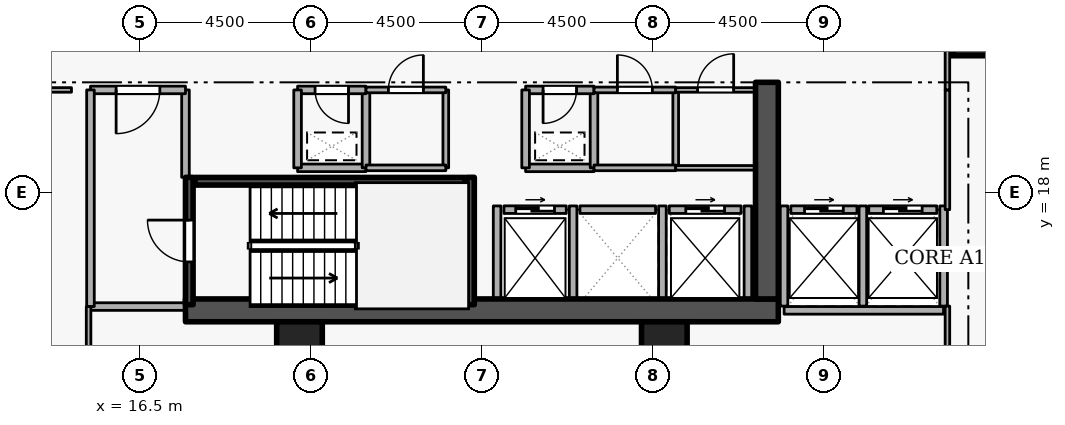
"""IFC4 building model, lengths in metres.
Left out: names, types, materials, properties, quantities, classifications, styles, units other than length and angle.
Written with IfcOpenShell. Run it as: python <this file> out.ifc"""

import sys

from ifc_helpers import new_model, si_unit, direction, frame, frame_2d, origin, origin_2d, place, context, subcontext, project, spatial, rectangle, extrude, element, fill, save


model = new_model("IFC4")
c1 = context("Model", 3, precision=1e-05, world=origin(), true_north=direction((0.0, 1.0)))
c2 = subcontext(c1, "Body", "Model", "MODEL_VIEW")
j1 = project(units=[si_unit("LENGTHUNIT", "METRE"), si_unit("PLANEANGLEUNIT", "RADIAN")], contexts=[c1])
p1 = place(None, origin())
s1 = spatial("IfcSite", under=j1, at=p1, CompositionType="ELEMENT")
p2 = place(p1, origin())
s2 = spatial("IfcBuilding", under=s1, at=p2, CompositionType="ELEMENT")
p3 = place(p2, frame((0.0, 0.0, 98.1)))
s3 = spatial("IfcBuildingStorey", under=s2, at=p3, CompositionType="ELEMENT", Elevation=98.1)
p4 = place(p3, frame((17.7, 14.9, 0.0), z_axis=(0.0, 0.0, 1.0), x_axis=(1.0, 0.0, 0.0)))
e1 = element("IfcWall", 1, at=p4, inside=s3, PredefinedType="SHEAR", context=c2, shape_type="SweptSolid", body=[
    extrude(rectangle(XDim=15.6, YDim=0.6, at=frame_2d((7.8, 0.0))), origin(), (0.0, 0.0, 1.0), 3.6),
])
p5 = place(p3, frame((33.0, 15.2, 0.0), z_axis=(0.0, 0.0, 1.0), x_axis=(0.0, 1.0, 0.0)))
e2 = element("IfcWall", 2, at=p5, inside=s3, PredefinedType="SHEAR", context=c2, shape_type="SweptSolid", body=[
    extrude(rectangle(XDim=5.7, YDim=0.6, at=frame_2d((2.85, 0.0))), origin(), (0.0, 0.0, 1.0), 3.6),
])
for number, where, z_axis, x_axis in (
    (3, (38.5, 22.2, 0.0), (0.0, 0.0, 1.0), (1.0, 0.0, 0.0)),
    (4, (20.7, 14.0, 0.0), (0.0, 0.0, 1.0), (1.0, 0.0, 0.0)),
    (5, (30.3, 14.0, 0.0), (0.0, 0.0, 1.0), (1.0, 0.0, 0.0)),
):
    element("IfcColumn", number, at=place(p3, frame(where, z_axis=z_axis, x_axis=x_axis)), inside=s3, PredefinedType="COLUMN", context=c2, shape_type="SweptSolid", body=[
        extrude(rectangle(XDim=1.2, YDim=1.2, at=origin_2d()), origin(), (0.0, 0.0, 1.0), 3.6),
    ])
p6 = place(p3, frame((26.08, 17.55, 0.0), z_axis=(0.0, 0.0, 1.0), x_axis=(1.0, 0.0, 0.0)))
e6 = element("IfcWall", 6, at=p6, inside=s3, PredefinedType="STANDARD", context=c2, shape_type="SweptSolid", body=[
    extrude(rectangle(XDim=1.64, YDim=0.2, at=frame_2d((0.82, 0.0))), origin(), (0.0, 0.0, 1.0), 3.3),
])
p7 = place(p6, frame((0.31, 0.0, 0.0)))
e7 = element("IfcOpeningElement", 7, at=p7, cuts=e6, PredefinedType="OPENING", context=c2, shape_type="SweptSolid", body=[
    extrude(rectangle(XDim=1.02, YDim=2.06, at=frame_2d((0.51, 1.03))), frame((0.0, 0.11, 0.0), z_axis=(0.0, -1.0, 0.0), x_axis=(1.0, 0.0, 0.0)), (0.0, 0.0, 1.0), 0.22),
])
p8 = place(p3, frame((28.08, 17.55, 0.0), z_axis=(0.0, 0.0, 1.0), x_axis=(1.0, 0.0, 0.0)))
e8 = element("IfcWall", 8, at=p8, inside=s3, PredefinedType="STANDARD", context=c2, shape_type="SweptSolid", body=[
    extrude(rectangle(XDim=1.99, YDim=0.2, at=frame_2d((0.995, 0.0))), origin(), (0.0, 0.0, 1.0), 3.3),
])
p9 = place(p3, frame((30.43, 17.55, 0.0), z_axis=(0.0, 0.0, 1.0), x_axis=(1.0, 0.0, 0.0)))
e9 = element("IfcWall", 9, at=p9, inside=s3, PredefinedType="STANDARD", context=c2, shape_type="SweptSolid", body=[
    extrude(rectangle(XDim=1.89, YDim=0.2, at=frame_2d((0.945, 0.0))), origin(), (0.0, 0.0, 1.0), 3.3),
])
p10 = place(p9, frame((0.435, 0.0, 0.0)))
e10 = element("IfcOpeningElement", 10, at=p10, cuts=e9, PredefinedType="OPENING", context=c2, shape_type="SweptSolid", body=[
    extrude(rectangle(XDim=1.02, YDim=2.06, at=frame_2d((0.51, 1.03))), frame((0.0, 0.11, 0.0), z_axis=(0.0, -1.0, 0.0), x_axis=(1.0, 0.0, 0.0)), (0.0, 0.0, 1.0), 0.22),
])
p11 = place(p3, frame((33.63, 17.55, 0.0), z_axis=(0.0, 0.0, 1.0), x_axis=(1.0, 0.0, 0.0)))
e11 = element("IfcWall", 11, at=p11, inside=s3, PredefinedType="STANDARD", context=c2, shape_type="SweptSolid", body=[
    extrude(rectangle(XDim=1.74, YDim=0.2, at=frame_2d((0.87, 0.0))), origin(), (0.0, 0.0, 1.0), 3.3),
])
p12 = place(p11, frame((0.36, 0.0, 0.0)))
e12 = element("IfcOpeningElement", 12, at=p12, cuts=e11, PredefinedType="OPENING", context=c2, shape_type="SweptSolid", body=[
    extrude(rectangle(XDim=1.02, YDim=2.06, at=frame_2d((0.51, 1.03))), frame((0.0, 0.11, 0.0), z_axis=(0.0, -1.0, 0.0), x_axis=(1.0, 0.0, 0.0)), (0.0, 0.0, 1.0), 0.22),
])
p13 = place(p3, frame((35.68, 17.55, 0.0), z_axis=(0.0, 0.0, 1.0), x_axis=(1.0, 0.0, 0.0)))
e13 = element("IfcWall", 13, at=p13, inside=s3, PredefinedType="STANDARD", context=c2, shape_type="SweptSolid", body=[
    extrude(rectangle(XDim=1.79, YDim=0.2, at=frame_2d((0.895, 0.0))), origin(), (0.0, 0.0, 1.0), 3.3),
])
p14 = place(p13, frame((0.385, 0.0, 0.0)))
e14 = element("IfcOpeningElement", 14, at=p14, cuts=e13, PredefinedType="OPENING", context=c2, shape_type="SweptSolid", body=[
    extrude(rectangle(XDim=1.02, YDim=2.06, at=frame_2d((0.51, 1.03))), frame((0.0, 0.11, 0.0), z_axis=(0.0, -1.0, 0.0), x_axis=(1.0, 0.0, 0.0)), (0.0, 0.0, 1.0), 0.22),
])
for number, where, z_axis, x_axis in (
    (15, (27.9, 15.212, 0.0), (0.0, 0.0, 1.0), (0.0, 1.0, 0.0)),
    (16, (25.9, 15.212, 0.0), (0.0, 0.0, 1.0), (0.0, 1.0, 0.0)),
    (17, (30.25, 15.212, 0.0), (0.0, 0.0, 1.0), (0.0, 1.0, 0.0)),
    (18, (32.5, 15.212, 0.0), (0.0, 0.0, 1.0), (0.0, 1.0, 0.0)),
):
    element("IfcWall", number, at=place(p3, frame(where, z_axis=z_axis, x_axis=x_axis)), inside=s3, PredefinedType="STANDARD", context=c2, shape_type="SweptSolid", body=[
        extrude(rectangle(XDim=2.436, YDim=0.2, at=frame_2d((1.218, 0.0))), origin(), (0.0, 0.0, 1.0), 3.3),
    ])
p15 = place(p3, frame((33.452, 14.9, 0.0), z_axis=(0.0, 0.0, 1.0), x_axis=(1.0, 0.0, 0.0)))
e19 = element("IfcWall", 19, at=p15, inside=s3, PredefinedType="STANDARD", context=c2, shape_type="SweptSolid", body=[
    extrude(rectangle(XDim=4.196, YDim=0.2, at=frame_2d((2.098, 0.0))), origin(), (0.0, 0.0, 1.0), 3.3),
])
for number, where, z_axis, x_axis in (
    (20, (35.525, 15.012, 0.0), (0.0, 0.0, 1.0), (0.0, 1.0, 0.0)),
    (21, (33.45, 15.012, 0.0), (0.0, 0.0, 1.0), (0.0, 1.0, 0.0)),
    (22, (37.65, 15.012, 0.0), (0.0, 0.0, 1.0), (0.0, 1.0, 0.0)),
):
    element("IfcWall", number, at=place(p3, frame(where, z_axis=z_axis, x_axis=x_axis)), inside=s3, PredefinedType="STANDARD", context=c2, shape_type="SweptSolid", body=[
        extrude(rectangle(XDim=2.636, YDim=0.2, at=frame_2d((1.318, 0.0))), origin(), (0.0, 0.0, 1.0), 3.3),
    ])
p16 = place(p3, frame((17.8, 15.05, 0.0), z_axis=(0.0, 0.0, 1.0), x_axis=(0.0, 1.0, 0.0)))
e23 = element("IfcWall", 23, at=p16, inside=s3, PredefinedType="SHEAR", context=c2, shape_type="SweptSolid", body=[
    extrude(rectangle(XDim=3.35, YDim=0.2, at=frame_2d((1.675, 0.0))), origin(), (0.0, 0.0, 1.0), 3.6),
])
p17 = place(p16, frame((1.125, 0.0, 0.0)))
e24 = element("IfcOpeningElement", 24, at=p17, cuts=e23, PredefinedType="OPENING", context=c2, shape_type="SweptSolid", body=[
    extrude(rectangle(XDim=1.1, YDim=2.1, at=frame_2d((0.55, 1.05))), frame((0.0, 0.11, 0.0), z_axis=(0.0, -1.0, 0.0), x_axis=(1.0, 0.0, 0.0)), (0.0, 0.0, 1.0), 0.22),
])
p18 = place(p3, frame((25.2, 18.4, 0.0), z_axis=(0.0, 0.0, 1.0), x_axis=(0.0, -1.0, 0.0)))
e25 = element("IfcWall", 25, at=p18, inside=s3, PredefinedType="SHEAR", context=c2, shape_type="SweptSolid", body=[
    extrude(rectangle(XDim=3.35, YDim=0.2, at=frame_2d((1.675, 0.0))), origin(), (0.0, 0.0, 1.0), 3.6),
])
p19 = place(p3, frame((25.05, 18.297, 0.0), z_axis=(0.0, 0.0, 1.0), x_axis=(-1.0, 0.0, 0.0)))
e26 = element("IfcWall", 26, at=p19, inside=s3, PredefinedType="SHEAR", context=c2, shape_type="SweptSolid", body=[
    extrude(rectangle(XDim=7.1, YDim=0.2, at=frame_2d((3.55, 0.0))), origin(), (0.0, 0.0, 1.0), 3.6),
])
p20 = place(p3, frame((15.2, 15.0, 0.0), z_axis=(0.0, 0.0, 1.0), x_axis=(1.0, 0.0, 0.0)))
e27 = element("IfcWall", 27, at=p20, inside=s3, PredefinedType="STANDARD", context=c2, shape_type="SweptSolid", body=[
    extrude(rectangle(XDim=2.5, YDim=0.2, at=frame_2d((1.25, 0.0))), origin(), (0.0, 0.0, 1.0), 3.3),
])
p21 = place(p3, frame((17.7, 18.4, 0.0), z_axis=(0.0, 0.0, 1.0), x_axis=(0.0, 1.0, 0.0)))
e28 = element("IfcWall", 28, at=p21, inside=s3, PredefinedType="STANDARD", context=c2, shape_type="SweptSolid", body=[
    extrude(rectangle(XDim=2.3, YDim=0.2, at=frame_2d((1.15, 0.0))), origin(), (0.0, 0.0, 1.0), 2.505),
])
p22 = place(p3, frame((17.7, 20.7, 0.0), z_axis=(0.0, 0.0, 1.0), x_axis=(-1.0, 0.0, 0.0)))
e29 = element("IfcWall", 29, at=p22, inside=s3, PredefinedType="STANDARD", context=c2, shape_type="SweptSolid", body=[
    extrude(rectangle(XDim=2.5, YDim=0.2, at=frame_2d((1.25, 0.0))), origin(), (0.0, 0.0, 1.0), 3.3),
])
p23 = place(p22, frame((0.675, 0.0, 0.0)))
e30 = element("IfcOpeningElement", 30, at=p23, cuts=e29, PredefinedType="OPENING", context=c2, shape_type="SweptSolid", body=[
    extrude(rectangle(XDim=1.15, YDim=2.1, at=frame_2d((0.575, 1.05))), frame((0.0, 0.11, 0.0), z_axis=(0.0, -1.0, 0.0), x_axis=(1.0, 0.0, 0.0)), (0.0, 0.0, 1.0), 0.22),
])
p24 = place(p3, frame((15.2, 20.7, 0.0), z_axis=(0.0, 0.0, 1.0), x_axis=(0.0, -1.0, 0.0)))
e31 = element("IfcWall", 31, at=p24, inside=s3, PredefinedType="STANDARD", context=c2, shape_type="SweptSolid", body=[
    extrude(rectangle(XDim=5.7, YDim=0.2, at=frame_2d((2.85, 0.0))), origin(), (0.0, 0.0, 1.0), 3.3),
])
p25 = place(p3, frame((26.65, 18.65, 0.0), z_axis=(0.0, 0.0, 1.0), x_axis=(1.0, 0.0, 0.0)))
e32 = element("IfcWall", 32, at=p25, inside=s3, PredefinedType="STANDARD", context=c2, shape_type="SweptSolid", body=[
    extrude(rectangle(XDim=1.8, YDim=0.2, at=frame_2d((0.9, 0.0))), origin(), (0.0, 0.0, 1.0), 3.3),
])
p26 = place(p3, frame((28.45, 18.65, 0.0), z_axis=(0.0, 0.0, 1.0), x_axis=(0.0, 1.0, 0.0)))
e33 = element("IfcWall", 33, at=p26, inside=s3, PredefinedType="STANDARD", context=c2, shape_type="SweptSolid", body=[
    extrude(rectangle(XDim=2.05, YDim=0.2, at=frame_2d((1.025, 0.0))), origin(), (0.0, 0.0, 1.0), 3.3),
])
p27 = place(p3, frame((28.45, 20.7, 0.0), z_axis=(0.0, 0.0, 1.0), x_axis=(-1.0, 0.0, 0.0)))
e34 = element("IfcWall", 34, at=p27, inside=s3, PredefinedType="STANDARD", context=c2, shape_type="SweptSolid", body=[
    extrude(rectangle(XDim=1.8, YDim=0.2, at=frame_2d((0.9, 0.0))), origin(), (0.0, 0.0, 1.0), 3.3),
])
p28 = place(p27, frame((0.46, 0.0, 0.0)))
e35 = element("IfcOpeningElement", 35, at=p28, cuts=e34, PredefinedType="OPENING", context=c2, shape_type="SweptSolid", body=[
    extrude(rectangle(XDim=0.88, YDim=2.04, at=frame_2d((0.44, 1.02))), frame((0.0, 0.11, 0.0), z_axis=(0.0, -1.0, 0.0), x_axis=(1.0, 0.0, 0.0)), (0.0, 0.0, 1.0), 0.22),
])
p29 = place(p3, frame((26.65, 20.7, 0.0), z_axis=(0.0, 0.0, 1.0), x_axis=(0.0, -1.0, 0.0)))
e36 = element("IfcWall", 36, at=p29, inside=s3, PredefinedType="STANDARD", context=c2, shape_type="SweptSolid", body=[
    extrude(rectangle(XDim=2.05, YDim=0.2, at=frame_2d((1.025, 0.0))), origin(), (0.0, 0.0, 1.0), 3.3),
])
p30 = place(p3, frame((20.65, 18.65, 0.0), z_axis=(0.0, 0.0, 1.0), x_axis=(1.0, 0.0, 0.0)))
e37 = element("IfcWall", 37, at=p30, inside=s3, PredefinedType="STANDARD", context=c2, shape_type="SweptSolid", body=[
    extrude(rectangle(XDim=1.8, YDim=0.2, at=frame_2d((0.9, 0.0))), origin(), (0.0, 0.0, 1.0), 3.3),
])
p31 = place(p3, frame((22.45, 18.65, 0.0), z_axis=(0.0, 0.0, 1.0), x_axis=(0.0, 1.0, 0.0)))
e38 = element("IfcWall", 38, at=p31, inside=s3, PredefinedType="STANDARD", context=c2, shape_type="SweptSolid", body=[
    extrude(rectangle(XDim=2.05, YDim=0.2, at=frame_2d((1.025, 0.0))), origin(), (0.0, 0.0, 1.0), 3.3),
])
p32 = place(p3, frame((22.45, 20.7, 0.0), z_axis=(0.0, 0.0, 1.0), x_axis=(-1.0, 0.0, 0.0)))
e39 = element("IfcWall", 39, at=p32, inside=s3, PredefinedType="STANDARD", context=c2, shape_type="SweptSolid", body=[
    extrude(rectangle(XDim=1.8, YDim=0.2, at=frame_2d((0.9, 0.0))), origin(), (0.0, 0.0, 1.0), 3.3),
])
p33 = place(p32, frame((0.46, 0.0, 0.0)))
e40 = element("IfcOpeningElement", 40, at=p33, cuts=e39, PredefinedType="OPENING", context=c2, shape_type="SweptSolid", body=[
    extrude(rectangle(XDim=0.88, YDim=2.04, at=frame_2d((0.44, 1.02))), frame((0.0, 0.11, 0.0), z_axis=(0.0, -1.0, 0.0), x_axis=(1.0, 0.0, 0.0)), (0.0, 0.0, 1.0), 0.22),
])
p34 = place(p3, frame((20.65, 20.7, 0.0), z_axis=(0.0, 0.0, 1.0), x_axis=(0.0, -1.0, 0.0)))
e41 = element("IfcWall", 41, at=p34, inside=s3, PredefinedType="STANDARD", context=c2, shape_type="SweptSolid", body=[
    extrude(rectangle(XDim=2.05, YDim=0.2, at=frame_2d((1.025, 0.0))), origin(), (0.0, 0.0, 1.0), 3.3),
])
p35 = place(p3, frame((24.55, 20.7, 0.0), z_axis=(0.0, 0.0, 1.0), x_axis=(0.0, -1.0, 0.0)))
e42 = element("IfcWall", 42, at=p35, inside=s3, PredefinedType="PARTITIONING", context=c2, shape_type="SweptSolid", body=[
    extrude(rectangle(XDim=2.05, YDim=0.15, at=frame_2d((1.025, 0.0))), origin(), (0.0, 0.0, 1.0), 3.3),
])
p36 = place(p3, frame((24.55, 18.65, 0.0), z_axis=(0.0, 0.0, 1.0), x_axis=(-1.0, 0.0, 0.0)))
e43 = element("IfcWall", 43, at=p36, inside=s3, PredefinedType="PARTITIONING", context=c2, shape_type="SweptSolid", body=[
    extrude(rectangle(XDim=2.1, YDim=0.15, at=frame_2d((1.05, 0.0))), origin(), (0.0, 0.0, 1.0), 3.3),
])
p37 = place(p3, frame((22.45, 20.7, 0.0), z_axis=(0.0, 0.0, 1.0), x_axis=(1.0, 0.0, 0.0)))
e44 = element("IfcWall", 44, at=p37, inside=s3, PredefinedType="PARTITIONING", context=c2, shape_type="SweptSolid", body=[
    extrude(rectangle(XDim=2.1, YDim=0.15, at=frame_2d((1.05, 0.0))), origin(), (0.0, 0.0, 1.0), 3.3),
])
p38 = place(p37, frame((0.59, 0.0, 0.0)))
e45 = element("IfcOpeningElement", 45, at=p38, cuts=e44, PredefinedType="OPENING", context=c2, shape_type="SweptSolid", body=[
    extrude(rectangle(XDim=0.92, YDim=2.08, at=frame_2d((0.46, 1.04))), frame((0.0, 0.085, 0.0), z_axis=(0.0, -1.0, 0.0), x_axis=(1.0, 0.0, 0.0)), (0.0, 0.0, 1.0), 0.17),
])
p39 = place(p3, frame((30.6, 20.7, 0.0), z_axis=(0.0, 0.0, 1.0), x_axis=(0.0, -1.0, 0.0)))
e46 = element("IfcWall", 46, at=p39, inside=s3, PredefinedType="PARTITIONING", context=c2, shape_type="SweptSolid", body=[
    extrude(rectangle(XDim=2.05, YDim=0.15, at=frame_2d((1.025, 0.0))), origin(), (0.0, 0.0, 1.0), 3.3),
])
p40 = place(p3, frame((30.6, 18.65, 0.0), z_axis=(0.0, 0.0, 1.0), x_axis=(-1.0, 0.0, 0.0)))
e47 = element("IfcWall", 47, at=p40, inside=s3, PredefinedType="PARTITIONING", context=c2, shape_type="SweptSolid", body=[
    extrude(rectangle(XDim=2.15, YDim=0.15, at=frame_2d((1.075, 0.0))), origin(), (0.0, 0.0, 1.0), 3.3),
])
p41 = place(p3, frame((28.45, 20.7, 0.0), z_axis=(0.0, 0.0, 1.0), x_axis=(1.0, 0.0, 0.0)))
e48 = element("IfcWall", 48, at=p41, inside=s3, PredefinedType="PARTITIONING", context=c2, shape_type="SweptSolid", body=[
    extrude(rectangle(XDim=2.15, YDim=0.15, at=frame_2d((1.075, 0.0))), origin(), (0.0, 0.0, 1.0), 3.3),
])
p42 = place(p41, frame((0.615, 0.0, 0.0)))
e49 = element("IfcOpeningElement", 49, at=p42, cuts=e48, PredefinedType="OPENING", context=c2, shape_type="SweptSolid", body=[
    extrude(rectangle(XDim=0.92, YDim=2.08, at=frame_2d((0.46, 1.04))), frame((0.0, 0.085, 0.0), z_axis=(0.0, -1.0, 0.0), x_axis=(1.0, 0.0, 0.0)), (0.0, 0.0, 1.0), 0.17),
])
p43 = place(p3, frame((32.7, 18.65, 0.0), z_axis=(0.0, 0.0, 1.0), x_axis=(-1.0, 0.0, 0.0)))
e50 = element("IfcWall", 50, at=p43, inside=s3, PredefinedType="PARTITIONING", context=c2, shape_type="SweptSolid", body=[
    extrude(rectangle(XDim=2.1, YDim=0.12, at=frame_2d((1.05, 0.0))), origin(), (0.0, 0.0, 1.0), 3.3),
])
p44 = place(p3, frame((30.6, 20.7, 0.0), z_axis=(0.0, 0.0, 1.0), x_axis=(1.0, 0.0, 0.0)))
e51 = element("IfcWall", 51, at=p44, inside=s3, PredefinedType="PARTITIONING", context=c2, shape_type="SweptSolid", body=[
    extrude(rectangle(XDim=2.1, YDim=0.12, at=frame_2d((1.05, 0.0))), origin(), (0.0, 0.0, 1.0), 3.3),
])
p45 = place(p44, frame((0.575, 0.0, 0.0)))
e52 = element("IfcOpeningElement", 52, at=p45, cuts=e51, PredefinedType="OPENING", context=c2, shape_type="SweptSolid", body=[
    extrude(rectangle(XDim=0.95, YDim=2.1, at=frame_2d((0.475, 1.05))), frame((0.0, 0.07, 0.0), z_axis=(0.0, -1.0, 0.0), x_axis=(1.0, 0.0, 0.0)), (0.0, 0.0, 1.0), 0.14),
])
p46 = place(p3, frame((13.25, 20.7, 0.0), z_axis=(0.0, 0.0, 1.0), x_axis=(1.0, 0.0, 0.0)))
e53 = element("IfcWall", 53, at=p46, inside=s3, PredefinedType="PARTITIONING", context=c2, shape_type="SweptSolid", body=[
    extrude(rectangle(XDim=1.45, YDim=0.12, at=frame_2d((0.725, 0.0))), origin(), (0.0, 0.0, 1.0), 3.3),
])
p47 = place(p3, frame((15.15, 15.0, 0.0), z_axis=(0.0, 0.0, 1.0), x_axis=(0.0, -1.0, 0.0)))
e54 = element("IfcWall", 54, at=p47, inside=s3, PredefinedType="PARTITIONING", context=c2, shape_type="SweptSolid", body=[
    extrude(rectangle(XDim=5.92, YDim=0.12, at=frame_2d((2.96, 0.0))), origin(), (0.0, 0.0, 1.0), 3.3),
])
p48 = place(p3, frame((37.75, 17.55, 0.0), z_axis=(0.0, 0.0, 1.0), x_axis=(0.0, 1.0, 0.0)))
e55 = element("IfcWall", 55, at=p48, inside=s3, PredefinedType="PARTITIONING", context=c2, shape_type="SweptSolid", body=[
    extrude(rectangle(XDim=3.15, YDim=0.12, at=frame_2d((1.575, 0.0))), origin(), (0.0, 0.0, 1.0), 3.3),
])
p49 = place(p3, frame((37.75, 20.7, 0.0), z_axis=(0.0, 0.0, 1.0), x_axis=(0.0, 1.0, 0.0)))
e56 = element("IfcWall", 56, at=p49, inside=s3, PredefinedType="PARTITIONING", context=c2, shape_type="SweptSolid", body=[
    extrude(rectangle(XDim=1.85, YDim=0.12, at=frame_2d((0.925, 0.0))), origin(), (0.0, 0.0, 1.0), 3.3),
])
p50 = place(p3, frame((37.75, 9.08, 0.0), z_axis=(0.0, 0.0, 1.0), x_axis=(0.0, 1.0, 0.0)))
e57 = element("IfcWall", 57, at=p50, inside=s3, PredefinedType="PARTITIONING", context=c2, shape_type="SweptSolid", body=[
    extrude(rectangle(XDim=5.932, YDim=0.12, at=frame_2d((2.966, 0.0))), origin(), (0.0, 0.0, 1.0), 3.3),
])
p51 = place(p7, origin())
e58 = element("IfcDoor", 58, at=p51, inside=s3, OperationType="SLIDING_TO_LEFT", PredefinedType="DOOR", context=c2, shape_type="SweptSolid", body=[
    extrude(rectangle(XDim=1.02, YDim=2.06, at=frame_2d((0.51, 1.03))), frame((0.0, 0.025, 0.0), z_axis=(0.0, -1.0, 0.0), x_axis=(1.0, 0.0, 0.0)), (0.0, 0.0, 1.0), 0.05),
])
fill(e7, e58)
p52 = place(p10, origin())
e59 = element("IfcDoor", 59, at=p52, inside=s3, OperationType="SLIDING_TO_LEFT", PredefinedType="DOOR", context=c2, shape_type="SweptSolid", body=[
    extrude(rectangle(XDim=1.02, YDim=2.06, at=frame_2d((0.51, 1.03))), frame((0.0, 0.025, 0.0), z_axis=(0.0, -1.0, 0.0), x_axis=(1.0, 0.0, 0.0)), (0.0, 0.0, 1.0), 0.05),
])
fill(e10, e59)
p53 = place(p12, origin())
e60 = element("IfcDoor", 60, at=p53, inside=s3, OperationType="SLIDING_TO_LEFT", PredefinedType="DOOR", context=c2, shape_type="SweptSolid", body=[
    extrude(rectangle(XDim=1.02, YDim=2.06, at=frame_2d((0.51, 1.03))), frame((0.0, 0.025, 0.0), z_axis=(0.0, -1.0, 0.0), x_axis=(1.0, 0.0, 0.0)), (0.0, 0.0, 1.0), 0.05),
])
fill(e12, e60)
p54 = place(p14, origin())
e61 = element("IfcDoor", 61, at=p54, inside=s3, OperationType="SLIDING_TO_LEFT", PredefinedType="DOOR", context=c2, shape_type="SweptSolid", body=[
    extrude(rectangle(XDim=1.02, YDim=2.06, at=frame_2d((0.51, 1.03))), frame((0.0, 0.025, 0.0), z_axis=(0.0, -1.0, 0.0), x_axis=(1.0, 0.0, 0.0)), (0.0, 0.0, 1.0), 0.05),
])
fill(e14, e61)
p55 = place(p17, origin())
e62 = element("IfcDoor", 62, at=p55, inside=s3, OperationType="SINGLE_SWING_RIGHT", PredefinedType="DOOR", context=c2, shape_type="SweptSolid", body=[
    extrude(rectangle(XDim=1.1, YDim=2.1, at=frame_2d((0.55, 1.05))), frame((0.0, 0.025, 0.0), z_axis=(0.0, -1.0, 0.0), x_axis=(1.0, 0.0, 0.0)), (0.0, 0.0, 1.0), 0.05),
])
fill(e24, e62)
p56 = place(p23, origin())
e63 = element("IfcDoor", 63, at=p56, inside=s3, OperationType="SINGLE_SWING_RIGHT", PredefinedType="DOOR", context=c2, shape_type="SweptSolid", body=[
    extrude(rectangle(XDim=1.15, YDim=2.1, at=frame_2d((0.575, 1.05))), frame((0.0, 0.025, 0.0), z_axis=(0.0, -1.0, 0.0), x_axis=(1.0, 0.0, 0.0)), (0.0, 0.0, 1.0), 0.05),
])
fill(e30, e63)
p57 = place(p28, origin())
e64 = element("IfcDoor", 64, at=p57, inside=s3, OperationType="SINGLE_SWING_RIGHT", PredefinedType="DOOR", context=c2, shape_type="SweptSolid", body=[
    extrude(rectangle(XDim=0.88, YDim=2.04, at=frame_2d((0.44, 1.02))), frame((0.0, 0.025, 0.0), z_axis=(0.0, -1.0, 0.0), x_axis=(1.0, 0.0, 0.0)), (0.0, 0.0, 1.0), 0.05),
])
fill(e35, e64)
p58 = place(p33, origin())
e65 = element("IfcDoor", 65, at=p58, inside=s3, OperationType="SINGLE_SWING_LEFT", PredefinedType="DOOR", context=c2, shape_type="SweptSolid", body=[
    extrude(rectangle(XDim=0.88, YDim=2.04, at=frame_2d((0.44, 1.02))), frame((0.0, 0.025, 0.0), z_axis=(0.0, -1.0, 0.0), x_axis=(1.0, 0.0, 0.0)), (0.0, 0.0, 1.0), 0.05),
])
fill(e40, e65)
p59 = place(p38, origin())
e66 = element("IfcDoor", 66, at=p59, inside=s3, OperationType="SINGLE_SWING_RIGHT", PredefinedType="DOOR", context=c2, shape_type="SweptSolid", body=[
    extrude(rectangle(XDim=0.92, YDim=2.08, at=frame_2d((0.46, 1.04))), frame((0.0, 0.025, 0.0), z_axis=(0.0, -1.0, 0.0), x_axis=(1.0, 0.0, 0.0)), (0.0, 0.0, 1.0), 0.05),
])
fill(e45, e66)
p60 = place(p42, origin())
e67 = element("IfcDoor", 67, at=p60, inside=s3, OperationType="SINGLE_SWING_LEFT", PredefinedType="DOOR", context=c2, shape_type="SweptSolid", body=[
    extrude(rectangle(XDim=0.92, YDim=2.08, at=frame_2d((0.46, 1.04))), frame((0.0, 0.025, 0.0), z_axis=(0.0, -1.0, 0.0), x_axis=(1.0, 0.0, 0.0)), (0.0, 0.0, 1.0), 0.05),
])
fill(e49, e67)
p61 = place(p45, origin())
e68 = element("IfcDoor", 68, at=p61, inside=s3, OperationType="SINGLE_SWING_RIGHT", PredefinedType="DOOR", context=c2, shape_type="SweptSolid", body=[
    extrude(rectangle(XDim=0.95, YDim=2.1, at=frame_2d((0.475, 1.05))), frame((0.0, 0.025, 0.0), z_axis=(0.0, -1.0, 0.0), x_axis=(1.0, 0.0, 0.0)), (0.0, 0.0, 1.0), 0.05),
])
fill(e52, e68)
save(model, sys.argv[1])
